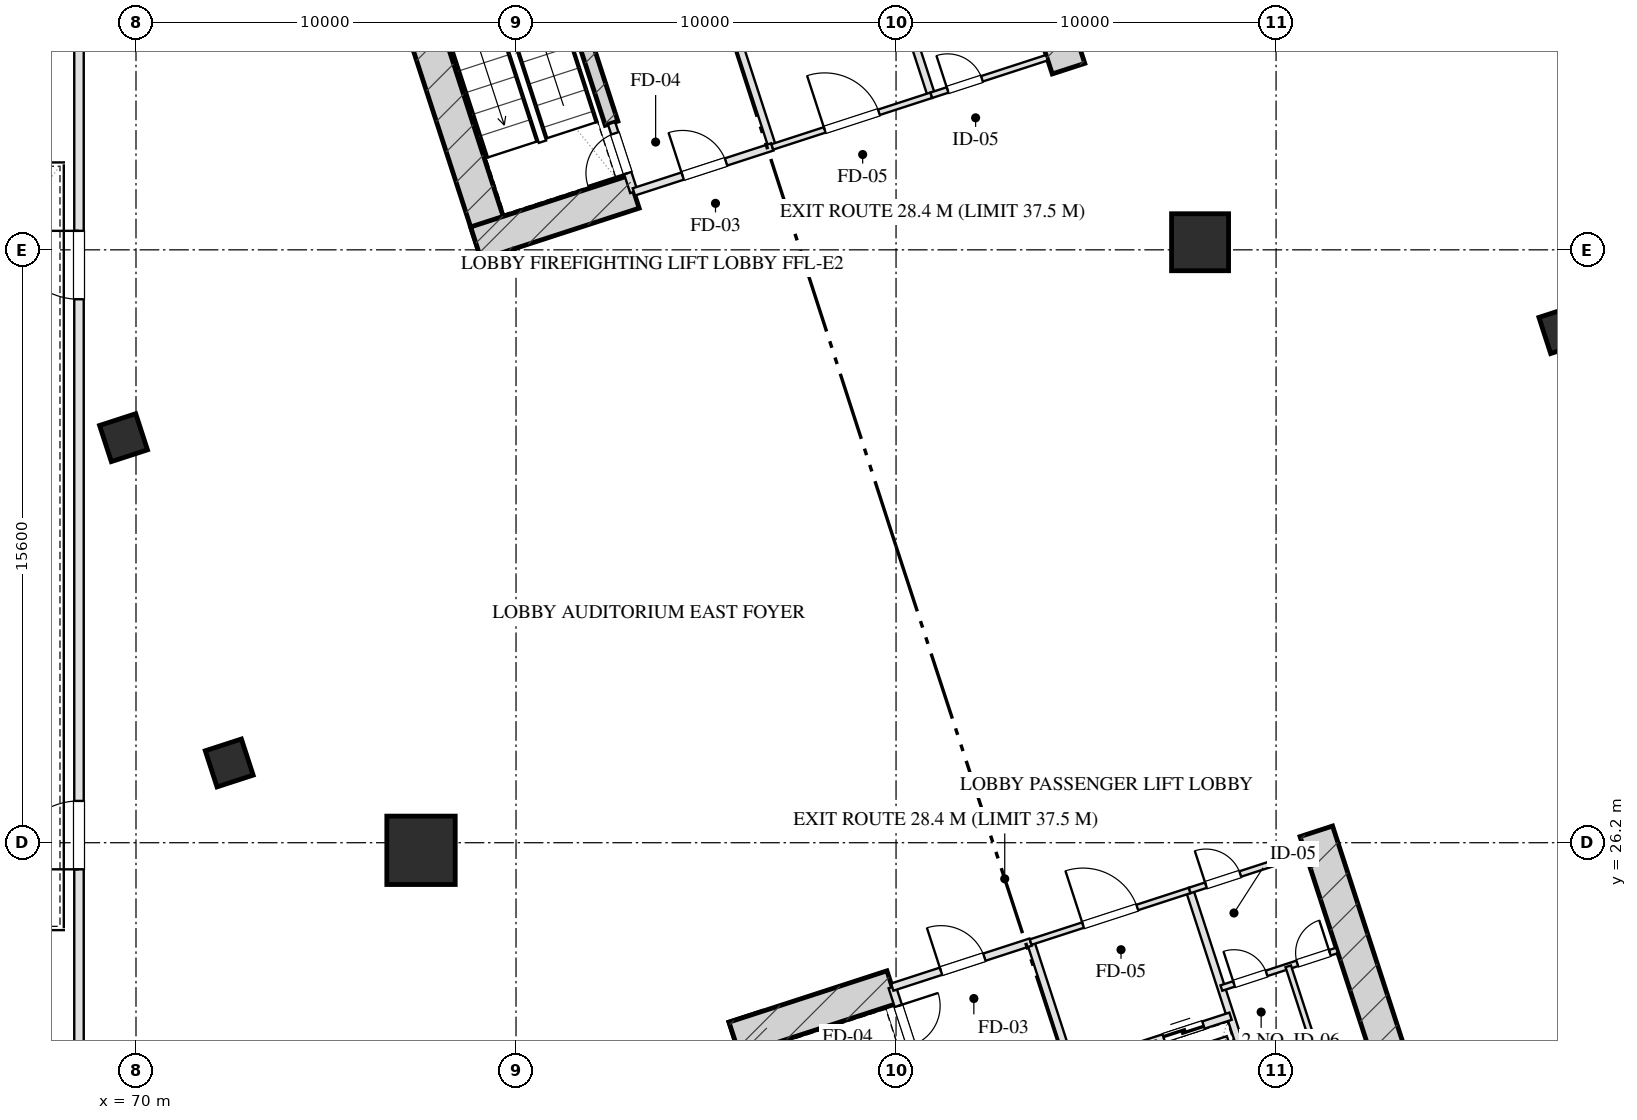
"""IFC4 building model, lengths in metres.
Left out: names, types, materials, properties, quantities, classifications, styles, units other than length and angle.
Written with IfcOpenShell. Run it as: python <this file> out.ifc"""

import sys

from ifc_helpers import new_model, si_unit, direction, frame, frame_2d, origin, origin_2d, place, context, subcontext, project, spatial, rectangle, hollow_rectangle, extrude, element, fill, save


model = new_model("IFC4")
c1 = context("Model", 3, precision=1e-05, world=origin(), true_north=direction((0.0, 1.0)))
c2 = subcontext(c1, "Body", "Model", "MODEL_VIEW")
j1 = project(units=[si_unit("LENGTHUNIT", "METRE"), si_unit("PLANEANGLEUNIT", "RADIAN")], contexts=[c1])
p1 = place(None, origin())
s1 = spatial("IfcSite", under=j1, at=p1, CompositionType="ELEMENT")
p2 = place(p1, origin())
s2 = spatial("IfcBuilding", under=s1, at=p2, CompositionType="ELEMENT")
p3 = place(p2, frame((0.0, 0.0, 6.0)))
s3 = spatial("IfcBuildingStorey", under=s2, at=p3, CompositionType="ELEMENT", Elevation=6.0)
p4 = place(p3, frame((86.032, 21.618, 0.0), z_axis=(0.0, 0.0, 1.0), x_axis=(0.30901438634, -0.951057363693, 0.0)))
e1 = element("IfcWall", 1, at=p4, inside=s3, PredefinedType="SHEAR", context=c2, shape_type="SweptSolid", body=[
    extrude(rectangle(XDim=9.78, YDim=0.9, at=frame_2d((4.89, 0.0))), origin(), (0.0, 0.0, 1.0), 5.5),
])
p5 = place(p3, frame((101.059, 26.5, 0.0), z_axis=(0.0, 0.0, 1.0), x_axis=(0.309021722829, -0.951054979914, 0.0)))
e2 = element("IfcWall", 2, at=p5, inside=s3, PredefinedType="SHEAR", context=c2, shape_type="SweptSolid", body=[
    extrude(rectangle(XDim=9.78, YDim=0.9, at=frame_2d((4.89, 0.0))), origin(), (0.0, 0.0, 1.0), 5.5),
])
p6 = place(p3, frame((85.743, 21.051, 0.0), z_axis=(0.0, 0.0, 1.0), x_axis=(0.951063623806, 0.308995118848, 0.0)))
e3 = element("IfcWall", 3, at=p6, inside=s3, PredefinedType="SHEAR", context=c2, shape_type="SweptSolid", body=[
    extrude(rectangle(XDim=4.37, YDim=0.9, at=frame_2d((2.185, 0.0))), origin(), (0.0, 0.0, 1.0), 5.5),
])
for number, where, z_axis, x_axis in (
    (4, (79.512, 41.685, 0.0), (0.0, 0.0, 1.0), (-0.309, 0.951, 0.0)),
    (5, (94.539, 46.568, 0.0), (0.0, 0.0, 1.0), (-0.309, 0.951, 0.0)),
):
    element("IfcWall", number, at=place(p3, frame(where, z_axis=z_axis, x_axis=x_axis)), inside=s3, PredefinedType="SHEAR", context=c2, shape_type="SweptSolid", body=[
        extrude(rectangle(XDim=9.78, YDim=0.9, at=frame_2d((4.89, 0.0))), origin(), (0.0, 0.0, 1.0), 5.5),
    ])
p7 = place(p3, frame((82.514, 45.131, 0.0), z_axis=(0.0, 0.0, 1.0), x_axis=(-0.308988790936, 0.951065679686, 0.0)))
e6 = element("IfcWall", 6, at=p7, inside=s3, PredefinedType="SHEAR", context=c2, shape_type="SweptSolid", body=[
    extrude(rectangle(XDim=6.98, YDim=0.35, at=frame_2d((3.49, 0.0))), origin(), (0.0, 0.0, 1.0), 5.5),
])
p8 = place(p3, frame((78.945, 41.974, 0.0), z_axis=(0.0, 0.0, 1.0), x_axis=(0.951058289404, 0.309011537255, 0.0)))
e7 = element("IfcWall", 7, at=p8, inside=s3, PredefinedType="SHEAR", context=c2, shape_type="SweptSolid", body=[
    extrude(rectangle(XDim=4.37, YDim=0.9, at=frame_2d((2.185, 0.0))), origin(), (0.0, 0.0, 1.0), 5.5),
])
p9 = place(p3, frame((77.5, 26.0, 0.0), z_axis=(0.0, 0.0, 1.0), x_axis=(1.0, 0.0, 0.0)))
e8 = element("IfcColumn", 8, at=p9, inside=s3, PredefinedType="COLUMN", context=c2, shape_type="SweptSolid", body=[
    extrude(hollow_rectangle(XDim=1.8, YDim=1.8, WallThickness=0.06, at=origin_2d()), origin(), (0.0, 0.0, 1.0), 5.501),
])
p10 = place(p3, frame((98.0, 42.0, 0.0), z_axis=(0.0, 0.0, 1.0), x_axis=(1.0, 0.0, 0.0)))
e9 = element("IfcColumn", 9, at=p10, inside=s3, PredefinedType="COLUMN", context=c2, shape_type="SweptSolid", body=[
    extrude(rectangle(XDim=1.5, YDim=1.5, at=origin_2d()), origin(), (0.0, 0.0, 1.0), 5.501),
])
for number, where, z_axis, x_axis in (
    (10, (72.453, 28.299, 0.0), (0.0, 0.0, 1.0), (0.951, 0.309, 0.0)),
    (11, (69.672, 36.858, 0.0), (0.0, 0.0, 1.0), (0.951, 0.309, 0.0)),
    (12, (107.547, 39.701, 0.0), (0.0, 0.0, 1.0), (0.951, 0.309, 0.0)),
):
    element("IfcColumn", number, at=place(p3, frame(where, z_axis=z_axis, x_axis=x_axis)), inside=s3, PredefinedType="COLUMN", context=c2, shape_type="SweptSolid", body=[
        extrude(hollow_rectangle(XDim=1.0, YDim=1.0, WallThickness=0.036, at=origin_2d()), origin(), (0.0, 0.0, 1.0), 5.501),
    ])
p11 = place(p3, frame((89.899, 22.401, 0.0), z_axis=(0.0, 0.0, 1.0), x_axis=(0.308932062672, -0.951084108086, 0.0)))
e13 = element("IfcWall", 13, at=p11, inside=s3, PredefinedType="PARTITIONING", context=c2, shape_type="SweptSolid", body=[
    extrude(rectangle(XDim=1.9, YDim=0.2, at=frame_2d((0.95, 0.0))), origin(), (0.0, 0.0, 1.0), 5.185),
])
p12 = place(p11, frame((0.52, 0.0, 0.0)))
e14 = element("IfcOpeningElement", 14, at=p12, cuts=e13, PredefinedType="OPENING", context=c2, shape_type="SweptSolid", body=[
    extrude(rectangle(XDim=1.1, YDim=2.05, at=frame_2d((0.55, 1.025))), frame((0.0, 0.11, 0.0), z_axis=(0.0, -1.0, 0.0), x_axis=(1.0, 0.0, 0.0)), (0.0, 0.0, 1.0), 0.22),
])
p13 = place(p3, frame((93.542, 23.585, 0.0), z_axis=(0.0, 0.0, 1.0), x_axis=(0.309042196757, -0.951048327176, 0.0)))
e15 = element("IfcWall", 15, at=p13, inside=s3, PredefinedType="PARTITIONING", context=c2, shape_type="SweptSolid", body=[
    extrude(rectangle(XDim=8.43, YDim=0.2, at=frame_2d((4.215, 0.0))), origin(), (0.0, 0.0, 1.0), 5.185),
])
p14 = place(p3, frame((89.899, 22.401, 0.0), z_axis=(0.0, 0.0, 1.0), x_axis=(0.951046716504, 0.309047153403, 0.0)))
e16 = element("IfcWall", 16, at=p14, inside=s3, PredefinedType="PARTITIONING", context=c2, shape_type="SweptSolid", body=[
    extrude(rectangle(XDim=3.83, YDim=0.2, at=frame_2d((1.915, 0.0))), origin(), (0.0, 0.0, 1.0), 5.185),
])
p15 = place(p14, frame((1.35, 0.0, 0.0)))
e17 = element("IfcOpeningElement", 17, at=p15, cuts=e16, PredefinedType="OPENING", context=c2, shape_type="SweptSolid", body=[
    extrude(rectangle(XDim=1.2, YDim=2.05, at=frame_2d((0.6, 1.025))), frame((0.0, 0.11, 0.0), z_axis=(0.0, -1.0, 0.0), x_axis=(1.0, 0.0, 0.0)), (0.0, 0.0, 1.0), 0.22),
])
p16 = place(p3, frame((97.727, 24.944, 0.0), z_axis=(0.0, 0.0, 1.0), x_axis=(0.309016001439, -0.951056838919, 0.0)))
e18 = element("IfcWall", 18, at=p16, inside=s3, PredefinedType="PARTITIONING", context=c2, shape_type="SweptSolid", body=[
    extrude(rectangle(XDim=8.43, YDim=0.2, at=frame_2d((4.215, 0.0))), origin(), (0.0, 0.0, 1.0), 5.185),
])
p17 = place(p3, frame((93.542, 23.585, 0.0), z_axis=(0.0, 0.0, 1.0), x_axis=(0.951063829732, 0.308994485023, 0.0)))
e19 = element("IfcWall", 19, at=p17, inside=s3, PredefinedType="PARTITIONING", context=c2, shape_type="SweptSolid", body=[
    extrude(rectangle(XDim=4.4, YDim=0.15, at=frame_2d((2.2, 0.0))), origin(), (0.0, 0.0, 1.0), 5.185),
])
p18 = place(p17, frame((1.45, 0.0, 0.0)))
e20 = element("IfcOpeningElement", 20, at=p18, cuts=e19, PredefinedType="OPENING", context=c2, shape_type="SweptSolid", body=[
    extrude(rectangle(XDim=1.5, YDim=2.05, at=frame_2d((0.75, 1.025))), frame((0.0, 0.085, 0.0), z_axis=(0.0, -1.0, 0.0), x_axis=(1.0, 0.0, 0.0)), (0.0, 0.0, 1.0), 0.17),
])
p19 = place(p3, frame((94.617, 20.275, 0.0), z_axis=(0.0, 0.0, 1.0), x_axis=(0.951058531764, 0.30901079133, 0.0)))
e21 = element("IfcWall", 21, at=p19, inside=s3, PredefinedType="PARTITIONING", context=c2, shape_type="SweptSolid", body=[
    extrude(rectangle(XDim=4.4, YDim=0.2, at=frame_2d((2.2, 0.0))), origin(), (0.0, 0.0, 1.0), 5.185),
])
p20 = place(p19, frame((0.45, 0.0, 0.0)))
e22 = element("IfcOpeningElement", 22, at=p20, cuts=e21, PredefinedType="OPENING", context=c2, shape_type="SweptSolid", body=[
    extrude(rectangle(XDim=1.1, YDim=2.05, at=frame_2d((0.55, 1.025))), frame((0.0, 0.11, 0.0), z_axis=(0.0, -1.0, 0.0), x_axis=(1.0, 0.0, 0.0)), (0.0, 0.0, 1.0), 0.22),
])
p21 = place(p19, frame((2.55, 0.0, 0.0)))
e23 = element("IfcOpeningElement", 23, at=p21, cuts=e21, PredefinedType="OPENING", context=c2, shape_type="SweptSolid", body=[
    extrude(rectangle(XDim=1.1, YDim=2.05, at=frame_2d((0.55, 1.025))), frame((0.0, 0.11, 0.0), z_axis=(0.0, -1.0, 0.0), x_axis=(1.0, 0.0, 0.0)), (0.0, 0.0, 1.0), 0.22),
])
p22 = place(p3, frame((97.727, 24.944, 0.0), z_axis=(0.0, 0.0, 1.0), x_axis=(0.951036872128, 0.309077446369, 0.0)))
e24 = element("IfcWall", 24, at=p22, inside=s3, PredefinedType="PARTITIONING", context=c2, shape_type="SweptSolid", body=[
    extrude(rectangle(XDim=3.2, YDim=0.15, at=frame_2d((1.6, 0.0))), origin(), (0.0, 0.0, 1.0), 5.185),
])
p23 = place(p22, frame((0.45, 0.0, 0.0)))
e25 = element("IfcOpeningElement", 25, at=p23, cuts=e24, PredefinedType="OPENING", context=c2, shape_type="SweptSolid", body=[
    extrude(rectangle(XDim=0.95, YDim=2.05, at=frame_2d((0.475, 1.025))), frame((0.0, 0.085, 0.0), z_axis=(0.0, -1.0, 0.0), x_axis=(1.0, 0.0, 0.0)), (0.0, 0.0, 1.0), 0.17),
])
p24 = place(p3, frame((98.561, 22.376, 0.0), z_axis=(0.0, 0.0, 1.0), x_axis=(0.95104415986, 0.309055020985, 0.0)))
e26 = element("IfcWall", 26, at=p24, inside=s3, PredefinedType="PARTITIONING", context=c2, shape_type="SweptSolid", body=[
    extrude(rectangle(XDim=3.2, YDim=0.15, at=frame_2d((1.6, 0.0))), origin(), (0.0, 0.0, 1.0), 5.185),
])
p25 = place(p24, frame((0.35, 0.0, 0.0)))
e27 = element("IfcOpeningElement", 27, at=p25, cuts=e26, PredefinedType="OPENING", context=c2, shape_type="SweptSolid", body=[
    extrude(rectangle(XDim=0.9, YDim=2.05, at=frame_2d((0.45, 1.025))), frame((0.0, 0.085, 0.0), z_axis=(0.0, -1.0, 0.0), x_axis=(1.0, 0.0, 0.0)), (0.0, 0.0, 1.0), 0.17),
])
p26 = place(p24, frame((2.1, 0.0, 0.0)))
e28 = element("IfcOpeningElement", 28, at=p26, cuts=e26, PredefinedType="OPENING", context=c2, shape_type="SweptSolid", body=[
    extrude(rectangle(XDim=0.9, YDim=2.05, at=frame_2d((0.45, 1.025))), frame((0.0, 0.085, 0.0), z_axis=(0.0, -1.0, 0.0), x_axis=(1.0, 0.0, 0.0)), (0.0, 0.0, 1.0), 0.17),
])
p27 = place(p3, frame((100.32, 22.948, 0.0), z_axis=(0.0, 0.0, 1.0), x_axis=(0.309035009867, -0.951050662518, 0.0)))
e29 = element("IfcWall", 29, at=p27, inside=s3, PredefinedType="PARTITIONING", context=c2, shape_type="SweptSolid", body=[
    extrude(rectangle(XDim=5.73, YDim=0.15, at=frame_2d((2.865, 0.0))), origin(), (0.0, 0.0, 1.0), 5.185),
])
p28 = place(p3, frame((83.101, 43.324, 0.0), z_axis=(0.0, 0.0, 1.0), x_axis=(-0.309048298632, 0.951046344356, 0.0)))
e30 = element("IfcWall", 30, at=p28, inside=s3, PredefinedType="PARTITIONING", context=c2, shape_type="SweptSolid", body=[
    extrude(rectangle(XDim=1.9, YDim=0.2, at=frame_2d((0.95, 0.0))), origin(), (0.0, 0.0, 1.0), 5.185),
])
p29 = place(p28, frame((0.52, 0.0, 0.0)))
e31 = element("IfcOpeningElement", 31, at=p29, cuts=e30, PredefinedType="OPENING", context=c2, shape_type="SweptSolid", body=[
    extrude(rectangle(XDim=1.1, YDim=2.05, at=frame_2d((0.55, 1.025))), frame((0.0, 0.11, 0.0), z_axis=(0.0, -1.0, 0.0), x_axis=(1.0, 0.0, 0.0)), (0.0, 0.0, 1.0), 0.22),
])
p30 = place(p3, frame((86.743, 44.508, 0.0), z_axis=(0.0, 0.0, 1.0), x_axis=(-0.309016001439, 0.951056838919, 0.0)))
e32 = element("IfcWall", 32, at=p30, inside=s3, PredefinedType="PARTITIONING", context=c2, shape_type="SweptSolid", body=[
    extrude(rectangle(XDim=8.43, YDim=0.2, at=frame_2d((4.215, 0.0))), origin(), (0.0, 0.0, 1.0), 5.185),
])
p31 = place(p3, frame((83.101, 43.324, 0.0), z_axis=(0.0, 0.0, 1.0), x_axis=(0.951052804469, 0.309028417967, 0.0)))
e33 = element("IfcWall", 33, at=p31, inside=s3, PredefinedType="PARTITIONING", context=c2, shape_type="SweptSolid", body=[
    extrude(rectangle(XDim=3.83, YDim=0.2, at=frame_2d((1.915, 0.0))), origin(), (0.0, 0.0, 1.0), 5.185),
])
p32 = place(p31, frame((1.35, 0.0, 0.0)))
e34 = element("IfcOpeningElement", 34, at=p32, cuts=e33, PredefinedType="OPENING", context=c2, shape_type="SweptSolid", body=[
    extrude(rectangle(XDim=1.2, YDim=2.05, at=frame_2d((0.6, 1.025))), frame((0.0, 0.11, 0.0), z_axis=(0.0, -1.0, 0.0), x_axis=(1.0, 0.0, 0.0)), (0.0, 0.0, 1.0), 0.22),
])
p33 = place(p3, frame((90.928, 45.868, 0.0), z_axis=(0.0, 0.0, 1.0), x_axis=(-0.309042196757, 0.951048327176, 0.0)))
e35 = element("IfcWall", 35, at=p33, inside=s3, PredefinedType="PARTITIONING", context=c2, shape_type="SweptSolid", body=[
    extrude(rectangle(XDim=8.43, YDim=0.2, at=frame_2d((4.215, 0.0))), origin(), (0.0, 0.0, 1.0), 5.185),
])
p34 = place(p3, frame((86.743, 44.508, 0.0), z_axis=(0.0, 0.0, 1.0), x_axis=(0.951063829732, 0.308994485023, 0.0)))
e36 = element("IfcWall", 36, at=p34, inside=s3, PredefinedType="PARTITIONING", context=c2, shape_type="SweptSolid", body=[
    extrude(rectangle(XDim=4.4, YDim=0.15, at=frame_2d((2.2, 0.0))), origin(), (0.0, 0.0, 1.0), 5.185),
])
p35 = place(p34, frame((1.45, 0.0, 0.0)))
e37 = element("IfcOpeningElement", 37, at=p35, cuts=e36, PredefinedType="OPENING", context=c2, shape_type="SweptSolid", body=[
    extrude(rectangle(XDim=1.5, YDim=2.05, at=frame_2d((0.75, 1.025))), frame((0.0, 0.085, 0.0), z_axis=(0.0, -1.0, 0.0), x_axis=(1.0, 0.0, 0.0)), (0.0, 0.0, 1.0), 0.17),
])
p36 = place(p3, frame((90.928, 45.868, 0.0), z_axis=(0.0, 0.0, 1.0), x_axis=(0.951059297078, 0.309008435874, 0.0)))
e38 = element("IfcWall", 38, at=p36, inside=s3, PredefinedType="PARTITIONING", context=c2, shape_type="SweptSolid", body=[
    extrude(rectangle(XDim=3.2, YDim=0.15, at=frame_2d((1.6, 0.0))), origin(), (0.0, 0.0, 1.0), 5.185),
])
p37 = place(p36, frame((0.45, 0.0, 0.0)))
e39 = element("IfcOpeningElement", 39, at=p37, cuts=e38, PredefinedType="OPENING", context=c2, shape_type="SweptSolid", body=[
    extrude(rectangle(XDim=0.95, YDim=2.05, at=frame_2d((0.475, 1.025))), frame((0.0, 0.085, 0.0), z_axis=(0.0, -1.0, 0.0), x_axis=(1.0, 0.0, 0.0)), (0.0, 0.0, 1.0), 0.17),
])
p38 = place(p3, frame((68.5, 18.0, 0.0), z_axis=(0.0, 0.0, 1.0), x_axis=(0.0, 1.0, 0.0)))
e40 = element("IfcWall", 40, at=p38, inside=s3, PredefinedType="PARTITIONING", context=c2, shape_type="SweptSolid", body=[
    extrude(rectangle(XDim=32.0, YDim=0.25, at=frame_2d((16.0, 0.0))), origin(), (0.0, 0.0, 1.0), 5.185),
])
p39 = place(p38, frame((7.5, 0.0, 0.0)))
e41 = element("IfcOpeningElement", 41, at=p39, cuts=e40, PredefinedType="OPENING", context=c2, shape_type="SweptSolid", body=[
    extrude(rectangle(XDim=1.8, YDim=2.05, at=frame_2d((0.9, 1.025))), frame((0.0, 0.135, 0.0), z_axis=(0.0, -1.0, 0.0), x_axis=(1.0, 0.0, 0.0)), (0.0, 0.0, 1.0), 0.27),
])
p40 = place(p38, frame((22.5, 0.0, 0.0)))
e42 = element("IfcOpeningElement", 42, at=p40, cuts=e40, PredefinedType="OPENING", context=c2, shape_type="SweptSolid", body=[
    extrude(rectangle(XDim=1.8, YDim=2.05, at=frame_2d((0.9, 1.025))), frame((0.0, 0.135, 0.0), z_axis=(0.0, -1.0, 0.0), x_axis=(1.0, 0.0, 0.0)), (0.0, 0.0, 1.0), 0.27),
])
p41 = place(p12, origin())
e43 = element("IfcDoor", 43, at=p41, inside=s3, OperationType="SINGLE_SWING_LEFT", PredefinedType="DOOR", context=c2, shape_type="SweptSolid", body=[
    extrude(rectangle(XDim=1.1, YDim=2.05, at=frame_2d((0.55, 1.025))), frame((0.0, 0.025, 0.0), z_axis=(0.0, -1.0, 0.0), x_axis=(1.0, 0.0, 0.0)), (0.0, 0.0, 1.0), 0.05),
])
fill(e14, e43)
p42 = place(p15, origin())
e44 = element("IfcDoor", 44, at=p42, inside=s3, OperationType="SINGLE_SWING_LEFT", PredefinedType="DOOR", context=c2, shape_type="SweptSolid", body=[
    extrude(rectangle(XDim=1.2, YDim=2.05, at=frame_2d((0.6, 1.025))), frame((0.0, 0.025, 0.0), z_axis=(0.0, -1.0, 0.0), x_axis=(1.0, 0.0, 0.0)), (0.0, 0.0, 1.0), 0.05),
])
fill(e17, e44)
p43 = place(p18, origin())
e45 = element("IfcDoor", 45, at=p43, inside=s3, OperationType="SINGLE_SWING_LEFT", PredefinedType="DOOR", context=c2, shape_type="SweptSolid", body=[
    extrude(rectangle(XDim=1.5, YDim=2.05, at=frame_2d((0.75, 1.025))), frame((0.0, 0.025, 0.0), z_axis=(0.0, -1.0, 0.0), x_axis=(1.0, 0.0, 0.0)), (0.0, 0.0, 1.0), 0.05),
])
fill(e20, e45)
p44 = place(p21, origin())
e46 = element("IfcDoor", 46, at=p44, inside=s3, OperationType="DOUBLE_DOOR_SLIDING", PredefinedType="DOOR", context=c2, shape_type="SweptSolid", body=[
    extrude(rectangle(XDim=1.1, YDim=2.05, at=frame_2d((0.55, 1.025))), frame((0.0, 0.025, 0.0), z_axis=(0.0, -1.0, 0.0), x_axis=(1.0, 0.0, 0.0)), (0.0, 0.0, 1.0), 0.05),
])
fill(e23, e46)
p45 = place(p23, origin())
e47 = element("IfcDoor", 47, at=p45, inside=s3, OperationType="SINGLE_SWING_LEFT", PredefinedType="DOOR", context=c2, shape_type="SweptSolid", body=[
    extrude(rectangle(XDim=0.95, YDim=2.05, at=frame_2d((0.475, 1.025))), frame((0.0, 0.025, 0.0), z_axis=(0.0, -1.0, 0.0), x_axis=(1.0, 0.0, 0.0)), (0.0, 0.0, 1.0), 0.05),
])
fill(e25, e47)
p46 = place(p25, origin())
e48 = element("IfcDoor", 48, at=p46, inside=s3, OperationType="SINGLE_SWING_LEFT", PredefinedType="DOOR", context=c2, shape_type="SweptSolid", body=[
    extrude(rectangle(XDim=0.9, YDim=2.05, at=frame_2d((0.45, 1.025))), frame((0.0, 0.025, 0.0), z_axis=(0.0, -1.0, 0.0), x_axis=(1.0, 0.0, 0.0)), (0.0, 0.0, 1.0), 0.05),
])
fill(e27, e48)
p47 = place(p26, origin())
e49 = element("IfcDoor", 49, at=p47, inside=s3, OperationType="SINGLE_SWING_RIGHT", PredefinedType="DOOR", context=c2, shape_type="SweptSolid", body=[
    extrude(rectangle(XDim=0.9, YDim=2.05, at=frame_2d((0.45, 1.025))), frame((0.0, 0.025, 0.0), z_axis=(0.0, -1.0, 0.0), x_axis=(1.0, 0.0, 0.0)), (0.0, 0.0, 1.0), 0.05),
])
fill(e28, e49)
p48 = place(p29, origin())
e50 = element("IfcDoor", 50, at=p48, inside=s3, OperationType="SINGLE_SWING_LEFT", PredefinedType="DOOR", context=c2, shape_type="SweptSolid", body=[
    extrude(rectangle(XDim=1.1, YDim=2.05, at=frame_2d((0.55, 1.025))), frame((0.0, 0.025, 0.0), z_axis=(0.0, -1.0, 0.0), x_axis=(1.0, 0.0, 0.0)), (0.0, 0.0, 1.0), 0.05),
])
fill(e31, e50)
p49 = place(p32, origin())
e51 = element("IfcDoor", 51, at=p49, inside=s3, OperationType="SINGLE_SWING_LEFT", PredefinedType="DOOR", context=c2, shape_type="SweptSolid", body=[
    extrude(rectangle(XDim=1.2, YDim=2.05, at=frame_2d((0.6, 1.025))), frame((0.0, 0.025, 0.0), z_axis=(0.0, -1.0, 0.0), x_axis=(1.0, 0.0, 0.0)), (0.0, 0.0, 1.0), 0.05),
])
fill(e34, e51)
p50 = place(p35, origin())
e52 = element("IfcDoor", 52, at=p50, inside=s3, OperationType="SINGLE_SWING_LEFT", PredefinedType="DOOR", context=c2, shape_type="SweptSolid", body=[
    extrude(rectangle(XDim=1.5, YDim=2.05, at=frame_2d((0.75, 1.025))), frame((0.0, 0.025, 0.0), z_axis=(0.0, -1.0, 0.0), x_axis=(1.0, 0.0, 0.0)), (0.0, 0.0, 1.0), 0.05),
])
fill(e37, e52)
p51 = place(p37, origin())
e53 = element("IfcDoor", 53, at=p51, inside=s3, OperationType="SINGLE_SWING_LEFT", PredefinedType="DOOR", context=c2, shape_type="SweptSolid", body=[
    extrude(rectangle(XDim=0.95, YDim=2.05, at=frame_2d((0.475, 1.025))), frame((0.0, 0.025, 0.0), z_axis=(0.0, -1.0, 0.0), x_axis=(1.0, 0.0, 0.0)), (0.0, 0.0, 1.0), 0.05),
])
fill(e39, e53)
p52 = place(p39, origin())
e54 = element("IfcDoor", 54, at=p52, inside=s3, OperationType="SINGLE_SWING_LEFT", PredefinedType="DOOR", context=c2, shape_type="SweptSolid", body=[
    extrude(rectangle(XDim=1.8, YDim=2.05, at=frame_2d((0.9, 1.025))), frame((0.0, 0.025, 0.0), z_axis=(0.0, -1.0, 0.0), x_axis=(1.0, 0.0, 0.0)), (0.0, 0.0, 1.0), 0.05),
])
fill(e41, e54)
p53 = place(p40, origin())
e55 = element("IfcDoor", 55, at=p53, inside=s3, OperationType="SINGLE_SWING_RIGHT", PredefinedType="DOOR", context=c2, shape_type="SweptSolid", body=[
    extrude(rectangle(XDim=1.8, YDim=2.05, at=frame_2d((0.9, 1.025))), frame((0.0, 0.025, 0.0), z_axis=(0.0, -1.0, 0.0), x_axis=(1.0, 0.0, 0.0)), (0.0, 0.0, 1.0), 0.05),
])
fill(e42, e55)
save(model, sys.argv[1])
